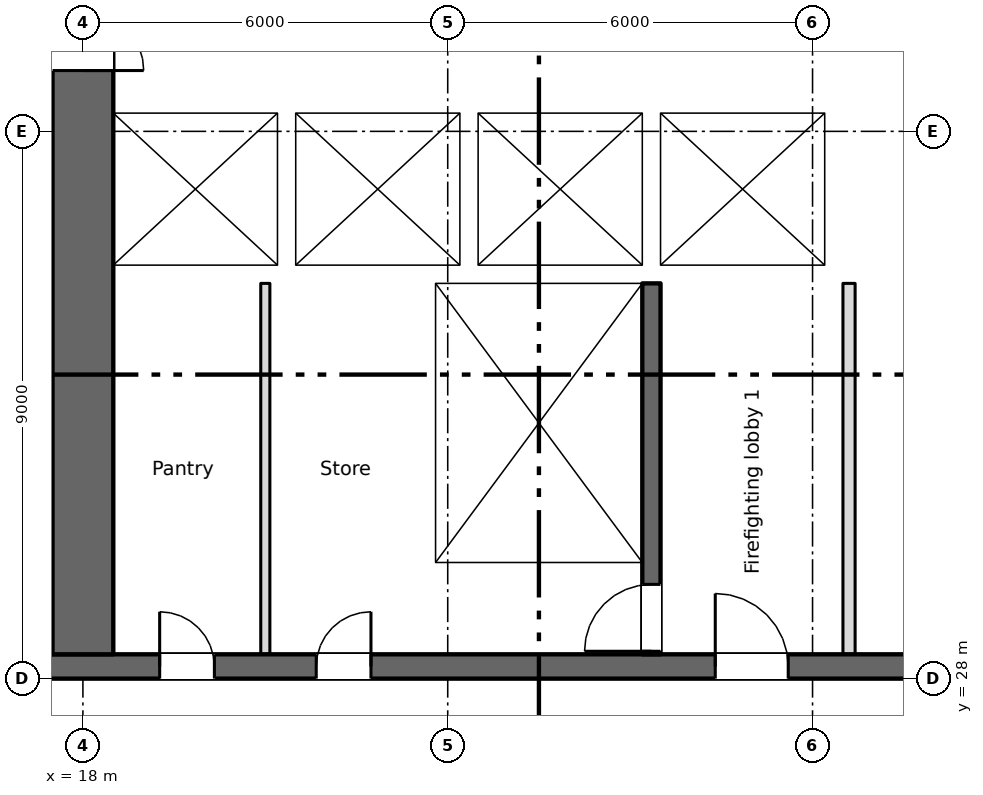
"""IFC4 building model, lengths in metres.
Left out: names, types, materials, properties, quantities, classifications, styles, units other than length and angle.
Written with IfcOpenShell. Run it as: python <this file> out.ifc"""

import sys

from ifc_helpers import new_model, si_unit, direction, frame, frame_2d, origin, place, context, subcontext, project, spatial, rectangle, extrude, element, fill, save


model = new_model("IFC4")
c1 = context("Model", 3, precision=1e-05, world=origin(), true_north=direction((0.0, 1.0)))
c2 = subcontext(c1, "Body", "Model", "MODEL_VIEW")
j1 = project(units=[si_unit("LENGTHUNIT", "METRE"), si_unit("PLANEANGLEUNIT", "RADIAN")], contexts=[c1])
p1 = place(None, origin())
s1 = spatial("IfcSite", under=j1, at=p1, CompositionType="ELEMENT")
p2 = place(p1, origin())
s2 = spatial("IfcBuilding", under=s1, at=p2, CompositionType="ELEMENT")
p3 = place(p2, frame((0.0, 0.0, 67.5)))
s3 = spatial("IfcBuildingStorey", under=s2, at=p3, CompositionType="ELEMENT", Elevation=67.5)
p4 = place(p3, frame((6.7, 28.2, 0.0), z_axis=(0.0, 0.0, 1.0), x_axis=(1.0, 0.0, 0.0)))
e1 = element("IfcWall", 1, at=p4, inside=s3, PredefinedType="SHEAR", context=c2, shape_type="SweptSolid", body=[
    extrude(rectangle(XDim=57.8, YDim=0.4, at=frame_2d((28.9, 0.0))), origin(), (0.0, 0.0, 1.0), 3.35),
])
p5 = place(p4, frame((12.562, 0.0, 0.0)))
e2 = element("IfcOpeningElement", 2, at=p5, cuts=e1, PredefinedType="OPENING", context=c2, shape_type="SweptSolid", body=[
    extrude(rectangle(XDim=0.9, YDim=2.1, at=frame_2d((0.45, 1.05))), frame((0.0, 0.21, 0.0), z_axis=(0.0, -1.0, 0.0), x_axis=(1.0, 0.0, 0.0)), (0.0, 0.0, 1.0), 0.42),
])
p6 = place(p4, frame((15.137, 0.0, 0.0)))
e3 = element("IfcOpeningElement", 3, at=p6, cuts=e1, PredefinedType="OPENING", context=c2, shape_type="SweptSolid", body=[
    extrude(rectangle(XDim=0.9, YDim=2.1, at=frame_2d((0.45, 1.05))), frame((0.0, 0.21, 0.0), z_axis=(0.0, -1.0, 0.0), x_axis=(1.0, 0.0, 0.0)), (0.0, 0.0, 1.0), 0.42),
])
p7 = place(p4, frame((49.85, 0.0, 0.0)))
e4 = element("IfcOpeningElement", 4, at=p7, cuts=e1, PredefinedType="OPENING", context=c2, shape_type="SweptSolid", body=[
    extrude(rectangle(XDim=0.9, YDim=2.1, at=frame_2d((0.45, 1.05))), frame((0.0, 0.21, 0.0), z_axis=(0.0, -1.0, 0.0), x_axis=(1.0, 0.0, 0.0)), (0.0, 0.0, 1.0), 0.42),
])
p8 = place(p4, frame((0.562, 0.0, 0.0)))
e5 = element("IfcOpeningElement", 5, at=p8, cuts=e1, PredefinedType="OPENING", context=c2, shape_type="SweptSolid", body=[
    extrude(rectangle(XDim=0.9, YDim=2.1, at=frame_2d((0.45, 1.05))), frame((0.0, 0.21, 0.0), z_axis=(0.0, -1.0, 0.0), x_axis=(1.0, 0.0, 0.0)), (0.0, 0.0, 1.0), 0.42),
])
p9 = place(p4, frame((2.137, 0.0, 0.0)))
e6 = element("IfcOpeningElement", 6, at=p9, cuts=e1, PredefinedType="OPENING", context=c2, shape_type="SweptSolid", body=[
    extrude(rectangle(XDim=0.9, YDim=2.1, at=frame_2d((0.45, 1.05))), frame((0.0, 0.21, 0.0), z_axis=(0.0, -1.0, 0.0), x_axis=(1.0, 0.0, 0.0)), (0.0, 0.0, 1.0), 0.42),
])
p10 = place(p4, frame((4.7, 0.0, 0.0)))
e7 = element("IfcOpeningElement", 7, at=p10, cuts=e1, PredefinedType="OPENING", context=c2, shape_type="SweptSolid", body=[
    extrude(rectangle(XDim=1.2, YDim=2.1, at=frame_2d((0.6, 1.05))), frame((0.0, 0.21, 0.0), z_axis=(0.0, -1.0, 0.0), x_axis=(1.0, 0.0, 0.0)), (0.0, 0.0, 1.0), 0.42),
])
p11 = place(p4, frame((31.7, 0.0, 0.0)))
e8 = element("IfcOpeningElement", 8, at=p11, cuts=e1, PredefinedType="OPENING", context=c2, shape_type="SweptSolid", body=[
    extrude(rectangle(XDim=1.2, YDim=2.1, at=frame_2d((0.6, 1.05))), frame((0.0, 0.21, 0.0), z_axis=(0.0, -1.0, 0.0), x_axis=(1.0, 0.0, 0.0)), (0.0, 0.0, 1.0), 0.42),
])
p12 = place(p4, frame((55.2, 0.0, 0.0)))
e9 = element("IfcOpeningElement", 9, at=p12, cuts=e1, PredefinedType="OPENING", context=c2, shape_type="SweptSolid", body=[
    extrude(rectangle(XDim=1.2, YDim=2.1, at=frame_2d((0.6, 1.05))), frame((0.0, 0.21, 0.0), z_axis=(0.0, -1.0, 0.0), x_axis=(1.0, 0.0, 0.0)), (0.0, 0.0, 1.0), 0.42),
])
p13 = place(p4, frame((21.7, 0.0, 0.0)))
e10 = element("IfcOpeningElement", 10, at=p13, cuts=e1, PredefinedType="OPENING", context=c2, shape_type="SweptSolid", body=[
    extrude(rectangle(XDim=1.2, YDim=2.1, at=frame_2d((0.6, 1.05))), frame((0.0, 0.21, 0.0), z_axis=(0.0, -1.0, 0.0), x_axis=(1.0, 0.0, 0.0)), (0.0, 0.0, 1.0), 0.42),
])
p14 = place(p4, frame((41.7, 0.0, 0.0)))
e11 = element("IfcOpeningElement", 11, at=p14, cuts=e1, PredefinedType="OPENING", context=c2, shape_type="SweptSolid", body=[
    extrude(rectangle(XDim=1.2, YDim=2.1, at=frame_2d((0.6, 1.05))), frame((0.0, 0.21, 0.0), z_axis=(0.0, -1.0, 0.0), x_axis=(1.0, 0.0, 0.0)), (0.0, 0.0, 1.0), 0.42),
])
p15 = place(p4, frame((24.85, 0.0, 0.0)))
e12 = element("IfcOpeningElement", 12, at=p15, cuts=e1, PredefinedType="OPENING", context=c2, shape_type="SweptSolid", body=[
    extrude(rectangle(XDim=2.4, YDim=2.1, at=frame_2d((1.2, 1.05))), frame((0.0, 0.21, 0.0), z_axis=(0.0, -1.0, 0.0), x_axis=(1.0, 0.0, 0.0)), (0.0, 0.0, 1.0), 0.42),
])
p16 = place(p4, frame((37.35, 0.0, 0.0)))
e13 = element("IfcOpeningElement", 13, at=p16, cuts=e1, PredefinedType="OPENING", context=c2, shape_type="SweptSolid", body=[
    extrude(rectangle(XDim=2.4, YDim=2.1, at=frame_2d((1.2, 1.05))), frame((0.0, 0.21, 0.0), z_axis=(0.0, -1.0, 0.0), x_axis=(1.0, 0.0, 0.0)), (0.0, 0.0, 1.0), 0.42),
])
p17 = place(p4, frame((7.85, 0.0, 0.0)))
e14 = element("IfcOpeningElement", 14, at=p17, cuts=e1, PredefinedType="OPENING", context=c2, shape_type="SweptSolid", body=[
    extrude(rectangle(XDim=2.4, YDim=2.1, at=frame_2d((1.2, 1.05))), frame((0.0, 0.21, 0.0), z_axis=(0.0, -1.0, 0.0), x_axis=(1.0, 0.0, 0.0)), (0.0, 0.0, 1.0), 0.42),
])
p18 = place(p4, frame((28.85, 0.0, 0.0)))
e15 = element("IfcOpeningElement", 15, at=p18, cuts=e1, PredefinedType="OPENING", context=c2, shape_type="SweptSolid", body=[
    extrude(rectangle(XDim=0.9, YDim=2.1, at=frame_2d((0.45, 1.05))), frame((0.0, 0.21, 0.0), z_axis=(0.0, -1.0, 0.0), x_axis=(1.0, 0.0, 0.0)), (0.0, 0.0, 1.0), 0.42),
])
p19 = place(p4, frame((34.85, 0.0, 0.0)))
e16 = element("IfcOpeningElement", 16, at=p19, cuts=e1, PredefinedType="OPENING", context=c2, shape_type="SweptSolid", body=[
    extrude(rectangle(XDim=0.9, YDim=2.1, at=frame_2d((0.45, 1.05))), frame((0.0, 0.21, 0.0), z_axis=(0.0, -1.0, 0.0), x_axis=(1.0, 0.0, 0.0)), (0.0, 0.0, 1.0), 0.42),
])
p20 = place(p3, frame((18.0, 28.4, 0.0), z_axis=(0.0, 0.0, 1.0), x_axis=(0.0, 1.0, 0.0)))
e17 = element("IfcWall", 17, at=p20, inside=s3, PredefinedType="SHEAR", context=c2, shape_type="SweptSolid", body=[
    extrude(rectangle(XDim=16.6, YDim=1.0, at=frame_2d((8.3, 0.0))), origin(), (0.0, 0.0, 1.0), 3.35),
])
p21 = place(p20, frame((9.6, 0.0, 0.0)))
e18 = element("IfcOpeningElement", 18, at=p21, cuts=e17, PredefinedType="OPENING", context=c2, shape_type="SweptSolid", body=[
    extrude(rectangle(XDim=2.0, YDim=2.1, at=frame_2d((1.0, 1.05))), frame((0.0, 0.51, 0.0), z_axis=(0.0, -1.0, 0.0), x_axis=(1.0, 0.0, 0.0)), (0.0, 0.0, 1.0), 1.02),
])
p22 = place(p20, frame((15.25, 0.0, 0.0)))
e19 = element("IfcOpeningElement", 19, at=p22, cuts=e17, PredefinedType="OPENING", context=c2, shape_type="SweptSolid", body=[
    extrude(rectangle(XDim=1.2, YDim=2.1, at=frame_2d((0.6, 1.05))), frame((0.0, 0.51, 0.0), z_axis=(0.0, -1.0, 0.0), x_axis=(1.0, 0.0, 0.0)), (0.0, 0.0, 1.0), 1.02),
])
p23 = place(p3, frame((23.65, 28.4, 0.0), z_axis=(0.0, 0.0, 1.0), x_axis=(0.0, 1.0, 0.0)))
e20 = element("IfcWall", 20, at=p23, inside=s3, PredefinedType="SHEAR", context=c2, shape_type="SweptSolid", body=[
    extrude(rectangle(XDim=6.1, YDim=0.3, at=frame_2d((3.05, 0.0))), origin(), (0.0, 0.0, 1.0), 3.35),
])
p24 = place(p3, frame((27.35, 28.4, 0.0), z_axis=(0.0, 0.0, 1.0), x_axis=(0.0, 1.0, 0.0)))
e21 = element("IfcWall", 21, at=p24, inside=s3, PredefinedType="SHEAR", context=c2, shape_type="SweptSolid", body=[
    extrude(rectangle(XDim=6.1, YDim=0.3, at=frame_2d((3.05, 0.0))), origin(), (0.0, 0.0, 1.0), 3.35),
])
p25 = place(p24, frame((0.05, 0.0, 0.0)))
e22 = element("IfcOpeningElement", 22, at=p25, cuts=e21, PredefinedType="OPENING", context=c2, shape_type="SweptSolid", body=[
    extrude(rectangle(XDim=1.1, YDim=2.1, at=frame_2d((0.55, 1.05))), frame((0.0, 0.16, 0.0), z_axis=(0.0, -1.0, 0.0), x_axis=(1.0, 0.0, 0.0)), (0.0, 0.0, 1.0), 0.32),
])
p26 = place(p3, frame((18.5, 34.65, 0.0), z_axis=(0.0, 0.0, 1.0), x_axis=(1.0, 0.0, 0.0)))
e23 = element("IfcWall", 23, at=p26, inside=s3, PredefinedType="SHEAR", context=c2, shape_type="SweptSolid", body=[
    extrude(rectangle(XDim=12.2, YDim=0.3, at=frame_2d((6.1, 0.0))), origin(), (0.0, 0.0, 1.0), 3.35),
])
p27 = place(p26, frame((9.8, 0.0, 0.0)))
e24 = element("IfcOpeningElement", 24, at=p27, cuts=e23, PredefinedType="OPENING", context=c2, shape_type="SweptSolid", body=[
    extrude(rectangle(XDim=1.1, YDim=2.1, at=frame_2d((0.55, 1.05))), frame((0.0, 0.16, 0.0), z_axis=(0.0, -1.0, 0.0), x_axis=(1.0, 0.0, 0.0)), (0.0, 0.0, 1.0), 0.32),
])
p28 = place(p3, frame((18.5, 37.45, 0.0), z_axis=(0.0, 0.0, 1.0), x_axis=(1.0, 0.0, 0.0)))
e25 = element("IfcWall", 25, at=p28, inside=s3, PredefinedType="SHEAR", context=c2, shape_type="SweptSolid", body=[
    extrude(rectangle(XDim=12.2, YDim=0.3, at=frame_2d((6.1, 0.0))), origin(), (0.0, 0.0, 1.0), 3.35),
])
p29 = place(p28, frame((0.8, 0.0, 0.0)))
e26 = element("IfcOpeningElement", 26, at=p29, cuts=e25, PredefinedType="OPENING", context=c2, shape_type="SweptSolid", body=[
    extrude(rectangle(XDim=1.1, YDim=2.1, at=frame_2d((0.55, 1.05))), frame((0.0, 0.16, 0.0), z_axis=(0.0, -1.0, 0.0), x_axis=(1.0, 0.0, 0.0)), (0.0, 0.0, 1.0), 0.32),
])
p30 = place(p28, frame((3.8, 0.0, 0.0)))
e27 = element("IfcOpeningElement", 27, at=p30, cuts=e25, PredefinedType="OPENING", context=c2, shape_type="SweptSolid", body=[
    extrude(rectangle(XDim=1.1, YDim=2.1, at=frame_2d((0.55, 1.05))), frame((0.0, 0.16, 0.0), z_axis=(0.0, -1.0, 0.0), x_axis=(1.0, 0.0, 0.0)), (0.0, 0.0, 1.0), 0.32),
])
p31 = place(p28, frame((6.8, 0.0, 0.0)))
e28 = element("IfcOpeningElement", 28, at=p31, cuts=e25, PredefinedType="OPENING", context=c2, shape_type="SweptSolid", body=[
    extrude(rectangle(XDim=1.1, YDim=2.1, at=frame_2d((0.55, 1.05))), frame((0.0, 0.16, 0.0), z_axis=(0.0, -1.0, 0.0), x_axis=(1.0, 0.0, 0.0)), (0.0, 0.0, 1.0), 0.32),
])
p32 = place(p3, frame((27.35, 34.8, 0.0), z_axis=(0.0, 0.0, 1.0), x_axis=(0.0, 1.0, 0.0)))
e29 = element("IfcWall", 29, at=p32, inside=s3, PredefinedType="SHEAR", context=c2, shape_type="SweptSolid", body=[
    extrude(rectangle(XDim=2.5, YDim=0.3, at=frame_2d((1.25, 0.0))), origin(), (0.0, 0.0, 1.0), 3.35),
])
p33 = place(p3, frame((30.45, 34.8, 0.0), z_axis=(0.0, 0.0, 1.0), x_axis=(0.0, 1.0, 0.0)))
e30 = element("IfcWall", 30, at=p33, inside=s3, PredefinedType="SHEAR", context=c2, shape_type="SweptSolid", body=[
    extrude(rectangle(XDim=2.5, YDim=0.5, at=frame_2d((1.25, 0.0))), origin(), (0.0, 0.0, 1.0), 3.35),
])
for number, where, z_axis, x_axis in (
    (31, (21.35, 34.8, 0.0), (0.0, 0.0, 1.0), (0.0, 1.0, 0.0)),
    (32, (24.35, 34.8, 0.0), (0.0, 0.0, 1.0), (0.0, 1.0, 0.0)),
):
    element("IfcWall", number, at=place(p3, frame(where, z_axis=z_axis, x_axis=x_axis)), inside=s3, PredefinedType="SHEAR", context=c2, shape_type="SweptSolid", body=[
        extrude(rectangle(XDim=2.5, YDim=0.3, at=frame_2d((1.25, 0.0))), origin(), (0.0, 0.0, 1.0), 3.35),
    ])
p34 = place(p3, frame((30.6, 28.4, 0.0), z_axis=(0.0, 0.0, 1.0), x_axis=(0.0, 1.0, 0.0)))
e33 = element("IfcWall", 33, at=p34, inside=s3, PredefinedType="PARTITIONING", context=c2, shape_type="SweptSolid", body=[
    extrude(rectangle(XDim=6.1, YDim=0.2, at=frame_2d((3.05, 0.0))), origin(), (0.0, 0.0, 1.0), 3.35),
])
p35 = place(p3, frame((21.0, 28.4, 0.0), z_axis=(0.0, 0.0, 1.0), x_axis=(0.0, 1.0, 0.0)))
e34 = element("IfcWall", 34, at=p35, inside=s3, PredefinedType="PARTITIONING", context=c2, shape_type="SweptSolid", body=[
    extrude(rectangle(XDim=6.1, YDim=0.15, at=frame_2d((3.05, 0.0))), origin(), (0.0, 0.0, 1.0), 3.35),
])
p36 = place(p5, origin())
e35 = element("IfcDoor", 35, at=p36, inside=s3, OperationType="SINGLE_SWING_LEFT", PredefinedType="DOOR", context=c2, shape_type="SweptSolid", body=[
    extrude(rectangle(XDim=0.9, YDim=2.1, at=frame_2d((0.45, 1.05))), frame((0.0, 0.025, 0.0), z_axis=(0.0, -1.0, 0.0), x_axis=(1.0, 0.0, 0.0)), (0.0, 0.0, 1.0), 0.05),
])
fill(e2, e35)
p37 = place(p6, origin())
e36 = element("IfcDoor", 36, at=p37, inside=s3, OperationType="SINGLE_SWING_RIGHT", PredefinedType="DOOR", context=c2, shape_type="SweptSolid", body=[
    extrude(rectangle(XDim=0.9, YDim=2.1, at=frame_2d((0.45, 1.05))), frame((0.0, 0.025, 0.0), z_axis=(0.0, -1.0, 0.0), x_axis=(1.0, 0.0, 0.0)), (0.0, 0.0, 1.0), 0.05),
])
fill(e3, e36)
p38 = place(p29, origin())
e37 = element("IfcDoor", 37, at=p38, inside=s3, OperationType="SLIDING_TO_LEFT", PredefinedType="DOOR", context=c2, shape_type="SweptSolid", body=[
    extrude(rectangle(XDim=1.1, YDim=2.1, at=frame_2d((0.55, 1.05))), frame((0.0, 0.025, 0.0), z_axis=(0.0, -1.0, 0.0), x_axis=(1.0, 0.0, 0.0)), (0.0, 0.0, 1.0), 0.05),
])
fill(e26, e37)
p39 = place(p30, origin())
e38 = element("IfcDoor", 38, at=p39, inside=s3, OperationType="SLIDING_TO_LEFT", PredefinedType="DOOR", context=c2, shape_type="SweptSolid", body=[
    extrude(rectangle(XDim=1.1, YDim=2.1, at=frame_2d((0.55, 1.05))), frame((0.0, 0.025, 0.0), z_axis=(0.0, -1.0, 0.0), x_axis=(1.0, 0.0, 0.0)), (0.0, 0.0, 1.0), 0.05),
])
fill(e27, e38)
p40 = place(p31, origin())
e39 = element("IfcDoor", 39, at=p40, inside=s3, OperationType="SLIDING_TO_LEFT", PredefinedType="DOOR", context=c2, shape_type="SweptSolid", body=[
    extrude(rectangle(XDim=1.1, YDim=2.1, at=frame_2d((0.55, 1.05))), frame((0.0, 0.025, 0.0), z_axis=(0.0, -1.0, 0.0), x_axis=(1.0, 0.0, 0.0)), (0.0, 0.0, 1.0), 0.05),
])
fill(e28, e39)
p41 = place(p27, origin())
e40 = element("IfcDoor", 40, at=p41, inside=s3, OperationType="SLIDING_TO_LEFT", PredefinedType="DOOR", context=c2, shape_type="SweptSolid", body=[
    extrude(rectangle(XDim=1.1, YDim=2.1, at=frame_2d((0.55, 1.05))), frame((0.0, 0.025, 0.0), z_axis=(0.0, -1.0, 0.0), x_axis=(1.0, 0.0, 0.0)), (0.0, 0.0, 1.0), 0.05),
])
fill(e24, e40)
p42 = place(p25, origin())
e41 = element("IfcDoor", 41, at=p42, inside=s3, OperationType="SINGLE_SWING_LEFT", PredefinedType="DOOR", context=c2, shape_type="SweptSolid", body=[
    extrude(rectangle(XDim=1.1, YDim=2.1, at=frame_2d((0.55, 1.05))), frame((0.0, 0.025, 0.0), z_axis=(0.0, -1.0, 0.0), x_axis=(1.0, 0.0, 0.0)), (0.0, 0.0, 1.0), 0.05),
])
fill(e22, e41)
p43 = place(p13, origin())
e42 = element("IfcDoor", 42, at=p43, inside=s3, OperationType="SINGLE_SWING_LEFT", PredefinedType="DOOR", context=c2, shape_type="SweptSolid", body=[
    extrude(rectangle(XDim=1.2, YDim=2.1, at=frame_2d((0.6, 1.05))), frame((0.0, 0.025, 0.0), z_axis=(0.0, -1.0, 0.0), x_axis=(1.0, 0.0, 0.0)), (0.0, 0.0, 1.0), 0.05),
])
fill(e10, e42)
p44 = place(p21, origin())
e43 = element("IfcDoor", 43, at=p44, inside=s3, OperationType="DOUBLE_DOOR_SINGLE_SWING", PredefinedType="DOOR", context=c2, shape_type="SweptSolid", body=[
    extrude(rectangle(XDim=2.0, YDim=2.1, at=frame_2d((1.0, 1.05))), frame((0.0, 0.025, 0.0), z_axis=(0.0, -1.0, 0.0), x_axis=(1.0, 0.0, 0.0)), (0.0, 0.0, 1.0), 0.05),
])
fill(e18, e43)
save(model, sys.argv[1])
